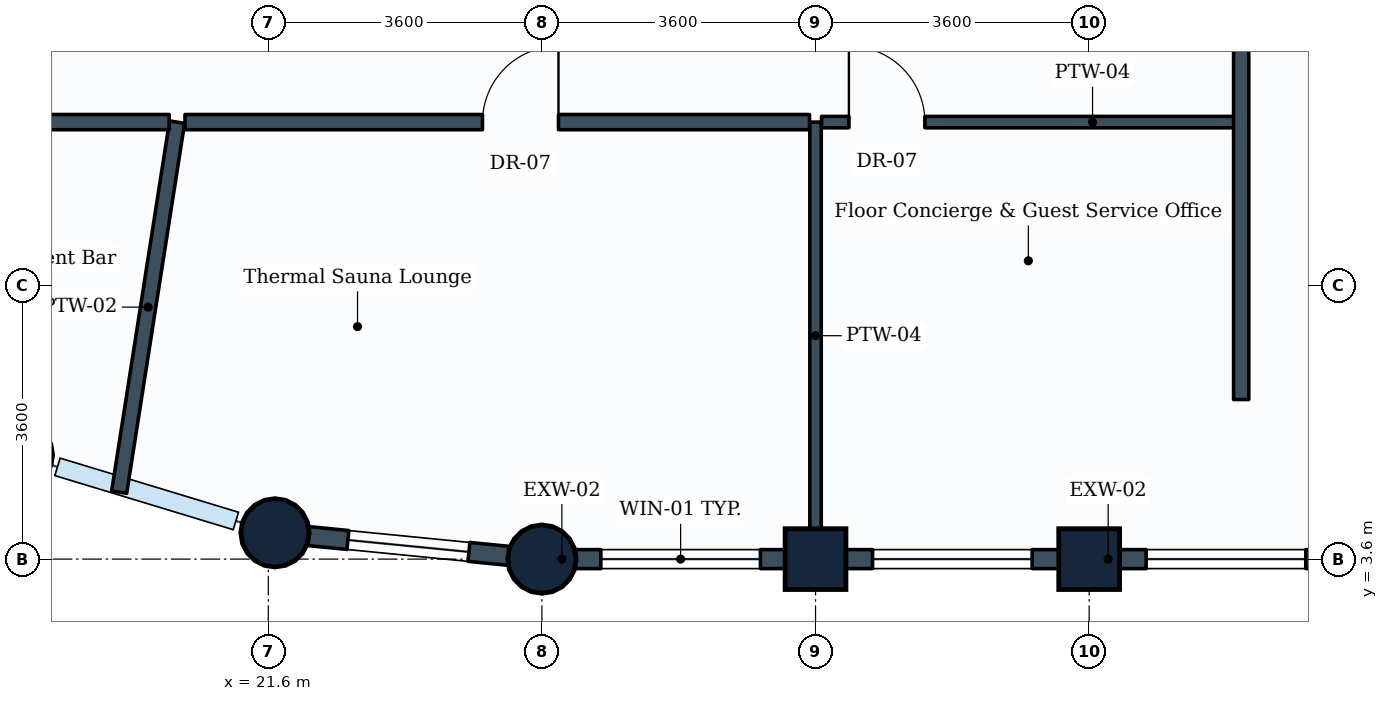
"""IFC4 building model, lengths in metres.
Left out: names, types, materials, properties, quantities, classifications, styles, units other than length and angle.
Written with IfcOpenShell. Run it as: python <this file> out.ifc"""

import sys

from ifc_helpers import new_model, si_unit, direction, frame, frame_2d, origin, origin_2d, place, context, subcontext, project, spatial, rectangle, circle, extrude, element, fill, save


model = new_model("IFC4")
c1 = context("Model", 3, precision=1e-05, world=origin(), true_north=direction((0.0, 1.0)))
c2 = subcontext(c1, "Body", "Model", "MODEL_VIEW")
j1 = project(units=[si_unit("LENGTHUNIT", "METRE"), si_unit("PLANEANGLEUNIT", "RADIAN")], contexts=[c1])
p1 = place(None, origin())
s1 = spatial("IfcSite", under=j1, at=p1, CompositionType="ELEMENT")
p2 = place(p1, origin())
s2 = spatial("IfcBuilding", under=s1, at=p2, CompositionType="ELEMENT")
p3 = place(p2, frame((0.0, 0.0, 239.0)))
s3 = spatial("IfcBuildingStorey", under=s2, at=p3, CompositionType="ELEMENT", Elevation=239.0)
for number, where, z_axis, x_axis in (
    (1, (18.312, 4.97, 0.0), (0.0, 0.0, 1.0), (1.0, 0.0, 0.0)),
    (2, (21.688, 3.946, 0.0), (0.0, 0.0, 1.0), (1.0, 0.0, 0.0)),
    (3, (25.2, 3.6, 0.0), (0.0, 0.0, 1.0), (1.0, 0.0, 0.0)),
):
    element("IfcColumn", number, at=place(p3, frame(where, z_axis=z_axis, x_axis=x_axis)), inside=s3, PredefinedType="COLUMN", context=c2, shape_type="SweptSolid", body=[
        extrude(circle(Radius=0.45, at=origin_2d()), origin(), (0.0, 0.0, 1.0), 3.6),
    ])
for number, where, z_axis, x_axis in (
    (4, (28.8, 3.6, 0.0), (0.0, 0.0, 1.0), (1.0, 0.0, 0.0)),
    (5, (32.4, 3.6, 0.0), (0.0, 0.0, 1.0), (1.0, 0.0, 0.0)),
):
    element("IfcColumn", number, at=place(p3, frame(where, z_axis=z_axis, x_axis=x_axis)), inside=s3, PredefinedType="COLUMN", context=c2, shape_type="SweptSolid", body=[
        extrude(rectangle(XDim=0.8, YDim=0.8, at=origin_2d()), origin(), (0.0, 0.0, 1.0), 3.6),
    ])
p4 = place(p3, frame((28.8, 3.6, 0.0), z_axis=(0.0, 0.0, 1.0), x_axis=(-1.0, 0.0, 0.0)))
e6 = element("IfcWall", 6, at=p4, inside=s3, PredefinedType="STANDARD", context=c2, shape_type="SweptSolid", body=[
    extrude(rectangle(XDim=3.6, YDim=0.25, at=frame_2d((1.8, 0.0))), origin(), (0.0, 0.0, 1.0), 2.83),
])
p5 = place(p4, frame((0.725, 0.0, 0.85)))
e7 = element("IfcOpeningElement", 7, at=p5, cuts=e6, PredefinedType="OPENING", context=c2, shape_type="SweptSolid", body=[
    extrude(rectangle(XDim=2.1, YDim=1.35, at=frame_2d((1.05, 0.675))), frame((0.0, 0.135, 0.0), z_axis=(0.0, -1.0, 0.0), x_axis=(1.0, 0.0, 0.0)), (0.0, 0.0, 1.0), 0.27),
])
p6 = place(p3, frame((32.4, 3.6, 0.0), z_axis=(0.0, 0.0, 1.0), x_axis=(-1.0, 0.0, 0.0)))
e8 = element("IfcWall", 8, at=p6, inside=s3, PredefinedType="STANDARD", context=c2, shape_type="SweptSolid", body=[
    extrude(rectangle(XDim=3.6, YDim=0.25, at=frame_2d((1.8, 0.0))), origin(), (0.0, 0.0, 1.0), 2.83),
])
p7 = place(p6, frame((0.75, 0.0, 0.85)))
e9 = element("IfcOpeningElement", 9, at=p7, cuts=e8, PredefinedType="OPENING", context=c2, shape_type="SweptSolid", body=[
    extrude(rectangle(XDim=2.1, YDim=1.35, at=frame_2d((1.05, 0.675))), frame((0.0, 0.135, 0.0), z_axis=(0.0, -1.0, 0.0), x_axis=(1.0, 0.0, 0.0)), (0.0, 0.0, 1.0), 0.27),
])
p8 = place(p3, frame((36.0, 3.6, 0.0), z_axis=(0.0, 0.0, 1.0), x_axis=(-1.0, 0.0, 0.0)))
e10 = element("IfcWall", 10, at=p8, inside=s3, PredefinedType="STANDARD", context=c2, shape_type="SweptSolid", body=[
    extrude(rectangle(XDim=3.6, YDim=0.25, at=frame_2d((1.8, 0.0))), origin(), (0.0, 0.0, 1.0), 2.83),
])
p9 = place(p8, frame((0.75, 0.0, 0.85)))
e11 = element("IfcOpeningElement", 11, at=p9, cuts=e10, PredefinedType="OPENING", context=c2, shape_type="SweptSolid", body=[
    extrude(rectangle(XDim=2.1, YDim=1.35, at=frame_2d((1.05, 0.675))), frame((0.0, 0.135, 0.0), z_axis=(0.0, -1.0, 0.0), x_axis=(1.0, 0.0, 0.0)), (0.0, 0.0, 1.0), 0.27),
])
p10 = place(p3, frame((25.2, 3.6, 0.0), z_axis=(0.0, 0.0, 1.0), x_axis=(-0.995183369056, 0.098030923459, 0.0)))
e12 = element("IfcWall", 12, at=p10, inside=s3, PredefinedType="STANDARD", context=c2, shape_type="SweptSolid", body=[
    extrude(rectangle(XDim=3.529, YDim=0.25, at=frame_2d((1.765, 0.0))), origin(), (0.0, 0.0, 1.0), 2.83),
])
p11 = place(p10, frame((0.965, 0.0, 0.85)))
e13 = element("IfcOpeningElement", 13, at=p11, cuts=e12, PredefinedType="OPENING", context=c2, shape_type="SweptSolid", body=[
    extrude(rectangle(XDim=1.6, YDim=1.35, at=frame_2d((0.8, 0.675))), frame((0.0, 0.135, 0.0), z_axis=(0.0, -1.0, 0.0), x_axis=(1.0, 0.0, 0.0)), (0.0, 0.0, 1.0), 0.27),
])
p12 = place(p3, frame((28.8, 9.35, 0.0), z_axis=(0.0, 0.0, 1.0), x_axis=(0.0, -1.0, 0.0)))
e14 = element("IfcWall", 14, at=p12, inside=s3, PredefinedType="PARTITIONING", context=c2, shape_type="SweptSolid", body=[
    extrude(rectangle(XDim=5.621, YDim=0.15, at=frame_2d((2.811, 0.0))), origin(), (0.0, 0.0, 1.0), 3.335),
])
p13 = place(p3, frame((20.4, 9.35, 0.0), z_axis=(0.0, 0.0, 1.0), x_axis=(-0.154606571481, -0.987976117148, 0.0)))
e15 = element("IfcWall", 15, at=p13, inside=s3, PredefinedType="PARTITIONING", context=c2, shape_type="SweptSolid", body=[
    extrude(rectangle(XDim=4.928, YDim=0.2, at=frame_2d((2.464, 0.0))), origin(), (0.0, 0.0, 1.0), 2.83),
])
p14 = place(p3, frame((13.133, 9.35, 0.0), z_axis=(0.0, 0.0, 1.0), x_axis=(1.0, 0.0, 0.0)))
e16 = element("IfcWall", 16, at=p14, inside=s3, PredefinedType="PARTITIONING", context=c2, shape_type="SweptSolid", body=[
    extrude(rectangle(XDim=7.163, YDim=0.2, at=frame_2d((3.582, 0.0))), origin(), (0.0, 0.0, 1.0), 3.02),
])
p15 = place(p14, frame((4.078, 0.0, 0.0)))
e17 = element("IfcOpeningElement", 17, at=p15, cuts=e16, PredefinedType="OPENING", context=c2, shape_type="SweptSolid", body=[
    extrude(rectangle(XDim=1.0, YDim=2.1, at=frame_2d((0.5, 1.05))), frame((0.0, 0.11, 0.0), z_axis=(0.0, -1.0, 0.0), x_axis=(1.0, 0.0, 0.0)), (0.0, 0.0, 1.0), 0.22),
])
p16 = place(p3, frame((20.504, 9.35, 0.0), z_axis=(0.0, 0.0, 1.0), x_axis=(1.0, 0.0, 0.0)))
e18 = element("IfcWall", 18, at=p16, inside=s3, PredefinedType="PARTITIONING", context=c2, shape_type="SweptSolid", body=[
    extrude(rectangle(XDim=8.217, YDim=0.2, at=frame_2d((4.108, 0.0))), origin(), (0.0, 0.0, 1.0), 3.02),
])
p17 = place(p16, frame((3.914, 0.0, 0.0)))
e19 = element("IfcOpeningElement", 19, at=p17, cuts=e18, PredefinedType="OPENING", context=c2, shape_type="SweptSolid", body=[
    extrude(rectangle(XDim=1.0, YDim=2.1, at=frame_2d((0.5, 1.05))), frame((0.0, 0.11, 0.0), z_axis=(0.0, -1.0, 0.0), x_axis=(1.0, 0.0, 0.0)), (0.0, 0.0, 1.0), 0.22),
])
p18 = place(p3, frame((28.879, 9.35, 0.0), z_axis=(0.0, 0.0, 1.0), x_axis=(1.0, 0.0, 0.0)))
e20 = element("IfcWall", 20, at=p18, inside=s3, PredefinedType="PARTITIONING", context=c2, shape_type="SweptSolid", body=[
    extrude(rectangle(XDim=5.521, YDim=0.15, at=frame_2d((2.76, 0.0))), origin(), (0.0, 0.0, 1.0), 3.335),
])
p19 = place(p18, frame((0.36, 0.0, 0.0)))
e21 = element("IfcOpeningElement", 21, at=p19, cuts=e20, PredefinedType="OPENING", context=c2, shape_type="SweptSolid", body=[
    extrude(rectangle(XDim=1.0, YDim=2.1, at=frame_2d((0.5, 1.05))), frame((0.0, 0.085, 0.0), z_axis=(0.0, -1.0, 0.0), x_axis=(1.0, 0.0, 0.0)), (0.0, 0.0, 1.0), 0.17),
])
p20 = place(p3, frame((34.4, 5.7, 0.0), z_axis=(0.0, 0.0, 1.0), x_axis=(0.0, 1.0, 0.0)))
e22 = element("IfcWall", 22, at=p20, inside=s3, PredefinedType="PARTITIONING", context=c2, shape_type="SweptSolid", body=[
    extrude(rectangle(XDim=12.15, YDim=0.2, at=frame_2d((6.075, 0.0))), origin(), (0.0, 0.0, 1.0), 3.03),
])
p21 = place(p5, origin())
e23 = element("IfcWindow", 23, at=p21, inside=s3, PartitioningType="SINGLE_PANEL", PredefinedType="WINDOW", context=c2, shape_type="SweptSolid", body=[
    extrude(rectangle(XDim=2.1, YDim=1.35, at=frame_2d((1.05, 0.675))), frame((0.0, 0.03, 0.0), z_axis=(0.0, -1.0, 0.0), x_axis=(1.0, 0.0, 0.0)), (0.0, 0.0, 1.0), 0.06),
])
fill(e7, e23)
p22 = place(p7, origin())
e24 = element("IfcWindow", 24, at=p22, inside=s3, PartitioningType="SINGLE_PANEL", PredefinedType="WINDOW", context=c2, shape_type="SweptSolid", body=[
    extrude(rectangle(XDim=2.1, YDim=1.35, at=frame_2d((1.05, 0.675))), frame((0.0, 0.03, 0.0), z_axis=(0.0, -1.0, 0.0), x_axis=(1.0, 0.0, 0.0)), (0.0, 0.0, 1.0), 0.06),
])
fill(e9, e24)
p23 = place(p9, origin())
e25 = element("IfcWindow", 25, at=p23, inside=s3, PartitioningType="SINGLE_PANEL", PredefinedType="WINDOW", context=c2, shape_type="SweptSolid", body=[
    extrude(rectangle(XDim=2.1, YDim=1.35, at=frame_2d((1.05, 0.675))), frame((0.0, 0.03, 0.0), z_axis=(0.0, -1.0, 0.0), x_axis=(1.0, 0.0, 0.0)), (0.0, 0.0, 1.0), 0.06),
])
fill(e11, e25)
p24 = place(p11, origin())
e26 = element("IfcWindow", 26, at=p24, inside=s3, PartitioningType="SINGLE_PANEL", PredefinedType="WINDOW", context=c2, shape_type="SweptSolid", body=[
    extrude(rectangle(XDim=1.6, YDim=1.35, at=frame_2d((0.8, 0.675))), frame((0.0, 0.03, 0.0), z_axis=(0.0, -1.0, 0.0), x_axis=(1.0, 0.0, 0.0)), (0.0, 0.0, 1.0), 0.06),
])
fill(e13, e26)
p25 = place(p17, origin())
e27 = element("IfcDoor", 27, at=p25, inside=s3, OperationType="SINGLE_SWING_RIGHT", PredefinedType="DOOR", context=c2, shape_type="SweptSolid", body=[
    extrude(rectangle(XDim=1.0, YDim=2.1, at=frame_2d((0.5, 1.05))), frame((0.0, 0.025, 0.0), z_axis=(0.0, -1.0, 0.0), x_axis=(1.0, 0.0, 0.0)), (0.0, 0.0, 1.0), 0.05),
])
fill(e19, e27)
p26 = place(p19, origin())
e28 = element("IfcDoor", 28, at=p26, inside=s3, OperationType="SINGLE_SWING_LEFT", PredefinedType="DOOR", context=c2, shape_type="SweptSolid", body=[
    extrude(rectangle(XDim=1.0, YDim=2.1, at=frame_2d((0.5, 1.05))), frame((0.0, 0.025, 0.0), z_axis=(0.0, -1.0, 0.0), x_axis=(1.0, 0.0, 0.0)), (0.0, 0.0, 1.0), 0.05),
])
fill(e21, e28)
save(model, sys.argv[1])
